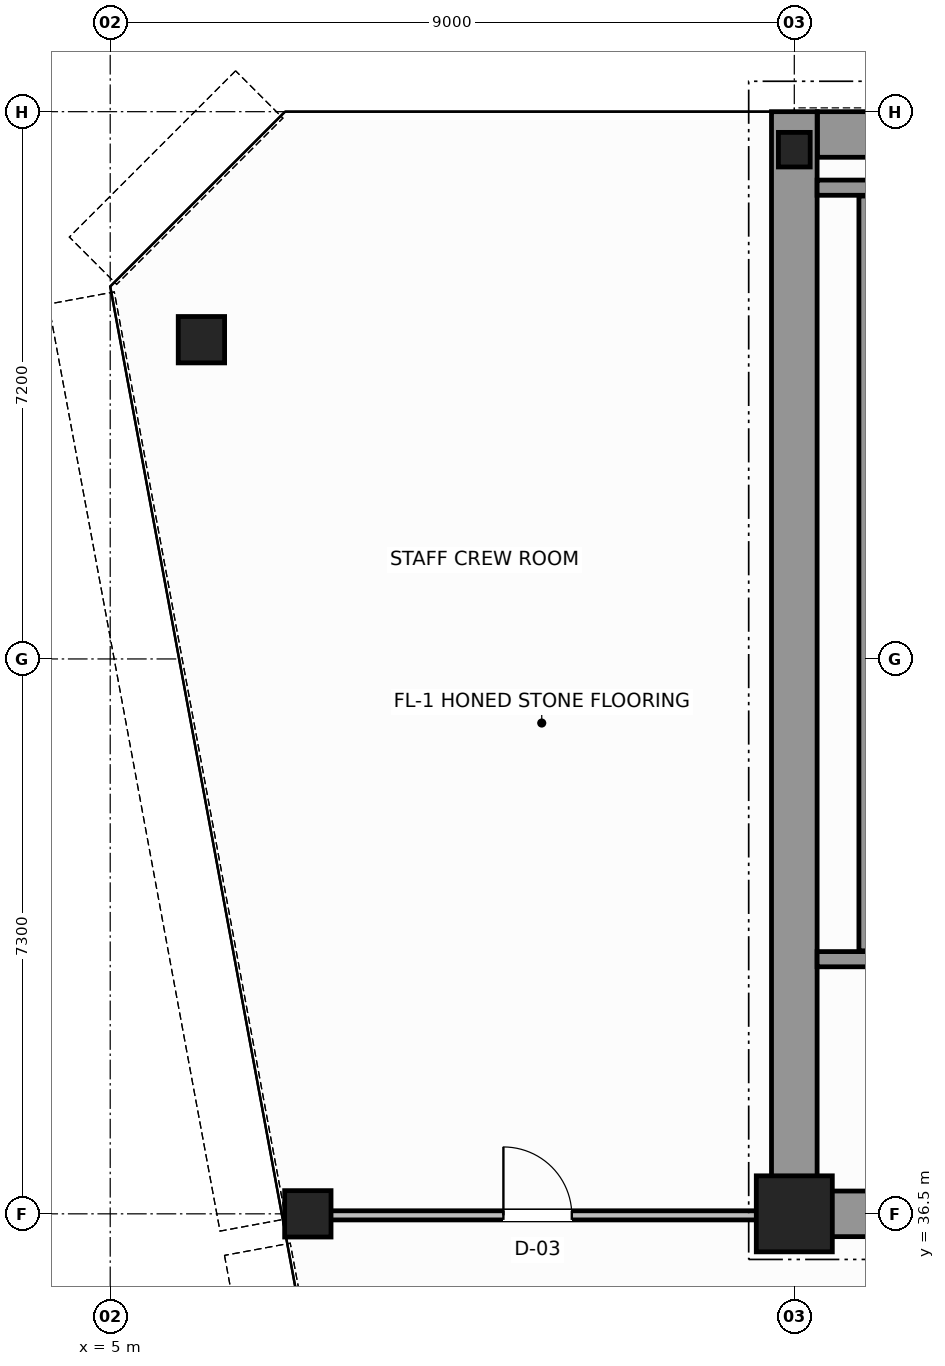
"""IFC4 building model, lengths in metres.
Left out: names, types, materials, properties, quantities, classifications, styles, units other than length and angle.
Written with IfcOpenShell. Run it as: python <this file> out.ifc"""

import sys

from ifc_helpers import new_model, si_unit, direction, frame, frame_2d, origin, origin_2d, place, context, subcontext, project, spatial, rectangle, hollow_circle, i_section, extrude, source, transform, mapped, element, fill, save


model = new_model("IFC4")
c1 = context("Model", 3, precision=1e-05, world=origin(), true_north=direction((0.0, 1.0)))
c2 = subcontext(c1, "Body", "Model", "MODEL_VIEW")
j1 = project(units=[si_unit("LENGTHUNIT", "METRE"), si_unit("PLANEANGLEUNIT", "RADIAN")], contexts=[c1])
p1 = place(None, origin())
s1 = spatial("IfcSite", under=j1, at=p1, CompositionType="ELEMENT")
p2 = place(p1, origin())
s2 = spatial("IfcBuilding", under=s1, at=p2, CompositionType="ELEMENT")
p3 = place(p2, frame((0.0, 0.0, 234.6)))
s3 = spatial("IfcBuildingStorey", under=s2, at=p3, CompositionType="ELEMENT", Elevation=234.6)
m1 = source(origin(), c2, "Body", "SweptSolid", [
    extrude(rectangle(XDim=1.0, YDim=1.0, at=origin_2d()), origin(), (0.0, 0.0, 1.0), 3.8),
])
p4 = place(p3, frame((14.0, 36.5, 0.0), z_axis=(0.0, 0.0, 1.0), x_axis=(1.0, 0.0, 0.0)))
e1 = element("IfcColumn", 1, at=p4, inside=s3, PredefinedType="COLUMN", context=c2, shape_type="MappedRepresentation", body=[
    mapped(m1, transform((0.0, 0.0, 0.0), scale=1.0)),
])
m2 = source(origin(), c2, "Body", "SweptSolid", [
    extrude(i_section(OverallWidth=0.418, OverallDepth=0.455, WebThickness=0.042, FlangeThickness=0.058, FilletRadius=0.015, at=origin_2d()), origin(), (0.0, 0.0, 1.0), 3.8),
])
p5 = place(p3, frame((14.0, 50.5, 0.0), z_axis=(0.0, 0.0, 1.0), x_axis=(1.0, 0.0, 0.0)))
e2 = element("IfcColumn", 2, at=p5, inside=s3, PredefinedType="COLUMN", context=c2, shape_type="MappedRepresentation", body=[
    mapped(m2, transform((0.0, 0.0, 0.0), scale=1.0)),
])
m3 = source(origin(), c2, "Body", "SweptSolid", [
    extrude(hollow_circle(Radius=0.305, WallThickness=0.03, at=origin_2d()), origin(), (0.0, 0.0, 1.0), 3.8),
])
for number, where, z_axis, x_axis in (
    (3, (6.2, 48.0, 0.0), (0.0, 0.0, 1.0), (1.0, 0.0, 0.0)),
    (4, (7.6, 36.5, 0.0), (0.0, 0.0, 1.0), (1.0, 0.0, 0.0)),
):
    element("IfcColumn", number, at=place(p3, frame(where, z_axis=z_axis, x_axis=x_axis)), inside=s3, PredefinedType="COLUMN", context=c2, shape_type="MappedRepresentation", body=[
        mapped(m3, transform((0.0, 0.0, 0.0), scale=1.0)),
    ])
p6 = place(p3, frame((14.304, 50.7, 0.0), z_axis=(0.0, 0.0, 1.0), x_axis=(1.0, 0.0, 0.0)))
e5 = element("IfcWall", 5, at=p6, inside=s3, PredefinedType="SHEAR", context=c2, shape_type="SweptSolid", body=[
    extrude(rectangle(XDim=19.694, YDim=0.6, at=frame_2d((9.847, 0.0))), origin(), (0.0, 0.0, 1.0), 3.8),
])
p7 = place(p3, frame((14.0, 36.5, 0.0), z_axis=(0.0, 0.0, 1.0), x_axis=(0.0, 1.0, 0.0)))
e6 = element("IfcWall", 6, at=p7, inside=s3, PredefinedType="SHEAR", context=c2, shape_type="SweptSolid", body=[
    extrude(rectangle(XDim=14.5, YDim=0.6, at=frame_2d((7.25, 0.0))), origin(), (0.0, 0.0, 1.0), 3.8),
])
p8 = place(p3, frame((14.32, 36.5, 0.0), z_axis=(0.0, 0.0, 1.0), x_axis=(1.0, 0.0, 0.0)))
e7 = element("IfcWall", 7, at=p8, inside=s3, PredefinedType="SHEAR", context=c2, shape_type="SweptSolid", body=[
    extrude(rectangle(XDim=3.88, YDim=0.6, at=frame_2d((1.94, 0.0))), origin(), (0.0, 0.0, 1.0), 2.58),
])
p9 = place(p3, frame((14.3, 39.85, 0.0), z_axis=(0.0, 0.0, 1.0), x_axis=(1.0, 0.0, 0.0)))
e8 = element("IfcWall", 8, at=p9, inside=s3, PredefinedType="SOLIDWALL", context=c2, shape_type="SweptSolid", body=[
    extrude(rectangle(XDim=4.3, YDim=0.2, at=frame_2d((2.15, 0.0))), origin(), (0.0, 0.0, 1.0), 3.8),
])
p10 = place(p9, frame((1.875, 0.0, 0.0)))
e9 = element("IfcOpeningElement", 9, at=p10, cuts=e8, PredefinedType="OPENING", context=c2, shape_type="SweptSolid", body=[
    extrude(rectangle(XDim=1.1, YDim=2.15, at=frame_2d((0.55, 1.075))), frame((0.0, 0.11, 0.0), z_axis=(0.0, -1.0, 0.0), x_axis=(1.0, 0.0, 0.0)), (0.0, 0.0, 1.0), 0.22),
])
p11 = place(p3, frame((14.3, 50.0, 0.0), z_axis=(0.0, 0.0, 1.0), x_axis=(1.0, 0.0, 0.0)))
e10 = element("IfcWall", 10, at=p11, inside=s3, PredefinedType="SOLIDWALL", context=c2, shape_type="SweptSolid", body=[
    extrude(rectangle(XDim=4.3, YDim=0.2, at=frame_2d((2.15, 0.0))), origin(), (0.0, 0.0, 1.0), 3.8),
])
p12 = place(p3, frame((14.95, 39.96, 0.0), z_axis=(0.0, 0.0, 1.0), x_axis=(0.0, 1.0, 0.0)))
e11 = element("IfcWall", 11, at=p12, inside=s3, PredefinedType="SOLIDWALL", context=c2, shape_type="SweptSolid", body=[
    extrude(rectangle(XDim=9.93, YDim=0.2, at=frame_2d((4.965, 0.0))), origin(), (0.0, 0.0, 1.0), 3.8),
])
p13 = place(p3, frame((7.306, 36.48, 0.0), z_axis=(0.0, 0.0, 1.0), x_axis=(1.0, 0.0, 0.0)))
e12 = element("IfcWall", 12, at=p13, inside=s3, PredefinedType="PARTITIONING", context=c2, shape_type="SweptSolid", body=[
    extrude(rectangle(XDim=6.634, YDim=0.12, at=frame_2d((3.317, 0.0))), origin(), (0.0, 0.0, 1.0), 2.37),
])
p14 = place(p13, frame((2.867, 0.0, 0.0)))
e13 = element("IfcOpeningElement", 13, at=p14, cuts=e12, PredefinedType="OPENING", context=c2, shape_type="SweptSolid", body=[
    extrude(rectangle(XDim=0.9, YDim=2.15, at=frame_2d((0.45, 1.075))), frame((0.0, 0.07, 0.0), z_axis=(0.0, -1.0, 0.0), x_axis=(1.0, 0.0, 0.0)), (0.0, 0.0, 1.0), 0.14),
])
m4 = source(origin(), c2, "Body", "SweptSolid", [
    extrude(rectangle(XDim=0.9, YDim=2.15, at=frame_2d((0.45, 1.075))), frame((0.0, 0.025, 0.0), z_axis=(0.0, -1.0, 0.0), x_axis=(1.0, 0.0, 0.0)), (0.0, 0.0, 1.0), 0.05),
])
p15 = place(p14, origin())
e14 = element("IfcDoor", 14, at=p15, inside=s3, OperationType="SINGLE_SWING_LEFT", PredefinedType="DOOR", context=c2, shape_type="MappedRepresentation", body=[
    mapped(m4, transform((0.0, 0.0, 0.0), scale=1.0)),
])
fill(e13, e14)
save(model, sys.argv[1])
